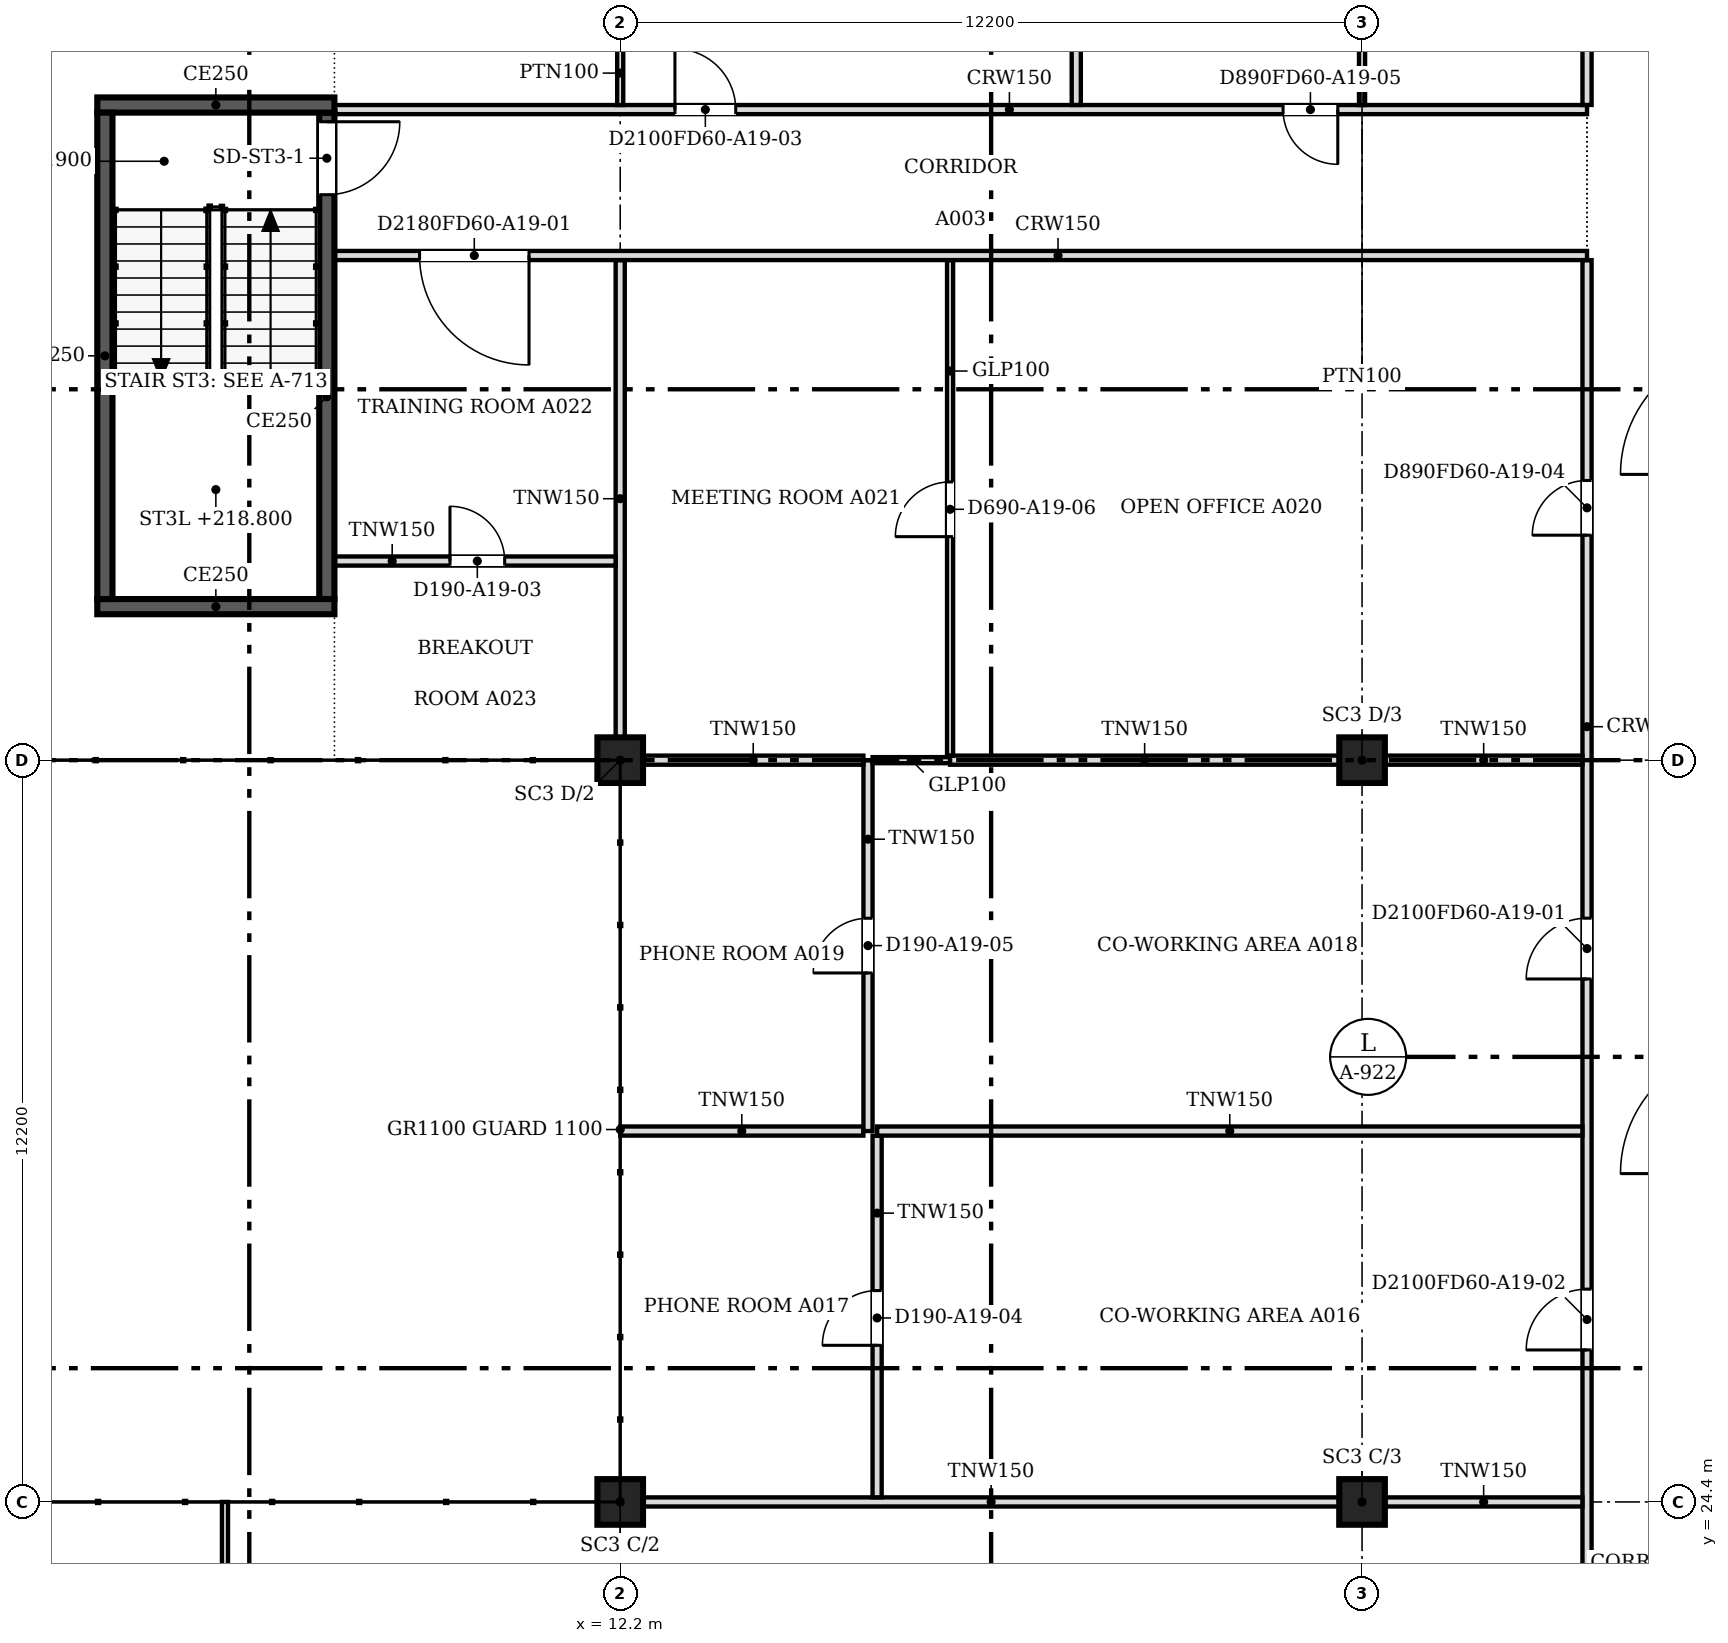
"""IFC4 building model, lengths in metres.
Left out: names, types, materials, properties, quantities, classifications, styles, units other than length and angle.
Written with IfcOpenShell. Run it as: python <this file> out.ifc"""

import sys

from ifc_helpers import new_model, si_unit, direction, frame, frame_2d, origin, origin_2d, place, context, subcontext, project, spatial, rectangle, extrude, source, transform, mapped, element, fill, save


model = new_model("IFC4")
c1 = context("Model", 3, precision=1e-05, world=origin(), true_north=direction((0.0, 1.0)))
c2 = subcontext(c1, "Body", "Model", "MODEL_VIEW")
j1 = project(units=[si_unit("LENGTHUNIT", "METRE"), si_unit("PLANEANGLEUNIT", "RADIAN")], contexts=[c1])
p1 = place(None, origin())
s1 = spatial("IfcSite", under=j1, at=p1, CompositionType="ELEMENT")
p2 = place(p1, origin())
s2 = spatial("IfcBuilding", under=s1, at=p2, CompositionType="ELEMENT")
p3 = place(p2, frame((0.0, 0.0, 216.9)))
s3 = spatial("IfcBuildingStorey", under=s2, at=p3, CompositionType="ELEMENT", Elevation=216.9)
for number, where, z_axis, x_axis in (
    (1, (12.2, 24.4, 0.0), (0.0, 0.0, 1.0), (1.0, 0.0, 0.0)),
    (2, (12.2, 36.6, 0.0), (0.0, 0.0, 1.0), (1.0, 0.0, 0.0)),
    (3, (24.4, 24.4, 0.0), (0.0, 0.0, 1.0), (1.0, 0.0, 0.0)),
    (4, (24.4, 36.6, 0.0), (0.0, 0.0, 1.0), (1.0, 0.0, 0.0)),
):
    element("IfcColumn", number, at=place(p3, frame(where, z_axis=z_axis, x_axis=x_axis)), inside=s3, PredefinedType="COLUMN", context=c2, shape_type="SweptSolid", body=[
        extrude(rectangle(XDim=0.75, YDim=0.75, at=origin_2d()), origin(), (0.0, 0.0, 1.0), 3.6),
    ])
p4 = place(p3, frame((7.5, 39.125, 0.0), z_axis=(0.0, 0.0, 1.0), x_axis=(-1.0, 0.0, 0.0)))
e5 = element("IfcWall", 5, at=p4, inside=s3, PredefinedType="SOLIDWALL", context=c2, shape_type="SweptSolid", body=[
    extrude(rectangle(XDim=3.9, YDim=0.25, at=frame_2d((1.95, 0.0))), origin(), (0.0, 0.0, 1.0), 3.8),
])
p5 = place(p3, frame((3.725, 39.25, 0.0), z_axis=(0.0, 0.0, 1.0), x_axis=(0.0, 1.0, 0.0)))
e6 = element("IfcWall", 6, at=p5, inside=s3, PredefinedType="SOLIDWALL", context=c2, shape_type="SweptSolid", body=[
    extrude(rectangle(XDim=8.0, YDim=0.25, at=frame_2d((4.0, 0.0))), origin(), (0.0, 0.0, 1.0), 3.8),
])
p6 = place(p3, frame((3.6, 47.375, 0.0), z_axis=(0.0, 0.0, 1.0), x_axis=(1.0, 0.0, 0.0)))
e7 = element("IfcWall", 7, at=p6, inside=s3, PredefinedType="SOLIDWALL", context=c2, shape_type="SweptSolid", body=[
    extrude(rectangle(XDim=3.9, YDim=0.25, at=frame_2d((1.95, 0.0))), origin(), (0.0, 0.0, 1.0), 3.8),
])
p7 = place(p3, frame((7.375, 47.25, 0.0), z_axis=(0.0, 0.0, 1.0), x_axis=(0.0, -1.0, 0.0)))
e8 = element("IfcWall", 8, at=p7, inside=s3, PredefinedType="SOLIDWALL", context=c2, shape_type="SweptSolid", body=[
    extrude(rectangle(XDim=8.0, YDim=0.25, at=frame_2d((4.0, 0.0))), origin(), (0.0, 0.0, 1.0), 3.8),
])
m1 = source(origin(), c2, "Body", "SweptSolid", [
    extrude(rectangle(XDim=1.2, YDim=2.1, at=frame_2d((0.6, 1.05))), frame((0.0, 0.135, 0.0), z_axis=(0.0, -1.0, 0.0), x_axis=(1.0, 0.0, 0.0)), (0.0, 0.0, 1.0), 0.27),
])
p8 = place(p7, frame((0.15, 0.0, 0.0)))
e9 = element("IfcOpeningElement", 9, at=p8, cuts=e8, PredefinedType="OPENING", context=c2, shape_type="MappedRepresentation", body=[
    mapped(m1, transform((0.0, 0.0, 0.0), scale=1.0)),
])
p9 = place(p3, frame((28.1, 18.8, 0.0), z_axis=(0.0, 0.0, 1.0), x_axis=(0.0, 1.0, 0.0)))
e10 = element("IfcWall", 10, at=p9, inside=s3, PredefinedType="PARTITIONING", context=c2, shape_type="SweptSolid", body=[
    extrude(rectangle(XDim=26.024, YDim=0.15, at=frame_2d((13.012, 0.0))), origin(), (0.0, 0.0, 1.0), 3.067),
])
m2 = source(origin(), c2, "Body", "SweptSolid", [
    extrude(rectangle(XDim=0.9, YDim=2.1, at=frame_2d((0.45, 1.05))), frame((0.0, 0.085, 0.0), z_axis=(0.0, -1.0, 0.0), x_axis=(1.0, 0.0, 0.0)), (0.0, 0.0, 1.0), 0.17),
])
p10 = place(p9, frame((1.1, 0.0, 0.0)))
e11 = element("IfcOpeningElement", 11, at=p10, cuts=e10, PredefinedType="OPENING", context=c2, shape_type="MappedRepresentation", body=[
    mapped(m2, transform((0.0, 0.0, 0.0), scale=1.0)),
])
m3 = source(origin(), c2, "Body", "SweptSolid", [
    extrude(rectangle(XDim=1.0, YDim=2.1, at=frame_2d((0.5, 1.05))), frame((0.0, 0.085, 0.0), z_axis=(0.0, -1.0, 0.0), x_axis=(1.0, 0.0, 0.0)), (0.0, 0.0, 1.0), 0.17),
])
p11 = place(p9, frame((14.201, 0.0, 0.0)))
e12 = element("IfcOpeningElement", 12, at=p11, cuts=e10, PredefinedType="OPENING", context=c2, shape_type="MappedRepresentation", body=[
    mapped(m3, transform((0.0, 0.0, 0.0), scale=1.0)),
])
p12 = place(p9, frame((8.1, 0.0, 0.0)))
e13 = element("IfcOpeningElement", 13, at=p12, cuts=e10, PredefinedType="OPENING", context=c2, shape_type="MappedRepresentation", body=[
    mapped(m3, transform((0.0, 0.0, 0.0), scale=1.0)),
])
p13 = place(p9, frame((21.5, 0.0, 0.0)))
e14 = element("IfcOpeningElement", 14, at=p13, cuts=e10, PredefinedType="OPENING", context=c2, shape_type="MappedRepresentation", body=[
    mapped(m2, transform((0.0, 0.0, 0.0), scale=1.0)),
])
p14 = place(p3, frame((5.7, 18.99, 0.0), z_axis=(0.0, 0.0, 1.0), x_axis=(0.0, 1.0, 0.0)))
e15 = element("IfcWall", 15, at=p14, inside=s3, PredefinedType="PARTITIONING", context=c2, shape_type="SweptSolid", body=[
    extrude(rectangle(XDim=5.41, YDim=0.1, at=frame_2d((2.705, 0.0))), origin(), (0.0, 0.0, 1.0), 3.067),
])
m4 = source(origin(), c2, "Body", "SweptSolid", [
    extrude(rectangle(XDim=0.9, YDim=2.1, at=frame_2d((0.45, 1.05))), frame((0.0, 0.06, 0.0), z_axis=(0.0, -1.0, 0.0), x_axis=(1.0, 0.0, 0.0)), (0.0, 0.0, 1.0), 0.12),
])
p15 = place(p14, frame((2.3, 0.0, 0.0)))
e16 = element("IfcOpeningElement", 16, at=p15, cuts=e15, PredefinedType="OPENING", context=c2, shape_type="MappedRepresentation", body=[
    mapped(m4, transform((0.0, 0.0, 0.0), scale=1.0)),
])
p16 = place(p3, frame((12.576, 24.4, 0.0), z_axis=(0.0, 0.0, 1.0), x_axis=(1.0, 0.0, 0.0)))
e17 = element("IfcWall", 17, at=p16, inside=s3, PredefinedType="PARTITIONING", context=c2, shape_type="SweptSolid", body=[
    extrude(rectangle(XDim=11.448, YDim=0.15, at=frame_2d((5.724, 0.0))), origin(), (0.0, 0.0, 1.0), 3.067),
])
p17 = place(p3, frame((24.776, 24.4, 0.0), z_axis=(0.0, 0.0, 1.0), x_axis=(1.0, 0.0, 0.0)))
e18 = element("IfcWall", 18, at=p17, inside=s3, PredefinedType="PARTITIONING", context=c2, shape_type="SweptSolid", body=[
    extrude(rectangle(XDim=3.248, YDim=0.15, at=frame_2d((1.624, 0.0))), origin(), (0.0, 0.0, 1.0), 3.067),
])
p18 = place(p3, frame((16.425, 24.476, 0.0), z_axis=(0.0, 0.0, 1.0), x_axis=(0.0, 1.0, 0.0)))
e19 = element("IfcWall", 19, at=p18, inside=s3, PredefinedType="PARTITIONING", context=c2, shape_type="SweptSolid", body=[
    extrude(rectangle(XDim=5.948, YDim=0.15, at=frame_2d((2.974, 0.0))), origin(), (0.0, 0.0, 1.0), 3.067),
])
p19 = place(p18, frame((2.5, 0.0, 0.0)))
e20 = element("IfcOpeningElement", 20, at=p19, cuts=e19, PredefinedType="OPENING", context=c2, shape_type="MappedRepresentation", body=[
    mapped(m2, transform((0.0, 0.0, 0.0), scale=1.0)),
])
p20 = place(p3, frame((12.2, 30.5, 0.0), z_axis=(0.0, 0.0, 1.0), x_axis=(1.0, 0.0, 0.0)))
e21 = element("IfcWall", 21, at=p20, inside=s3, PredefinedType="PARTITIONING", context=c2, shape_type="SweptSolid", body=[
    extrude(rectangle(XDim=3.999, YDim=0.15, at=frame_2d((2.0, 0.0))), origin(), (0.0, 0.0, 1.0), 3.067),
])
p21 = place(p3, frame((16.275, 30.5, 0.0), z_axis=(0.0, 0.0, 1.0), x_axis=(0.0, 1.0, 0.0)))
e22 = element("IfcWall", 22, at=p21, inside=s3, PredefinedType="PARTITIONING", context=c2, shape_type="SweptSolid", body=[
    extrude(rectangle(XDim=6.1, YDim=0.15, at=frame_2d((3.05, 0.0))), origin(), (0.0, 0.0, 1.0), 3.067),
])
p22 = place(p21, frame((2.6, 0.0, 0.0)))
e23 = element("IfcOpeningElement", 23, at=p22, cuts=e22, PredefinedType="OPENING", context=c2, shape_type="MappedRepresentation", body=[
    mapped(m2, transform((0.0, 0.0, 0.0), scale=1.0)),
])
p23 = place(p3, frame((16.425, 30.5, 0.0), z_axis=(0.0, 0.0, 1.0), x_axis=(1.0, 0.0, 0.0)))
e24 = element("IfcWall", 24, at=p23, inside=s3, PredefinedType="PARTITIONING", context=c2, shape_type="SweptSolid", body=[
    extrude(rectangle(XDim=11.599, YDim=0.15, at=frame_2d((5.799, 0.0))), origin(), (0.0, 0.0, 1.0), 3.067),
])
p24 = place(p3, frame((12.576, 36.6, 0.0), z_axis=(0.0, 0.0, 1.0), x_axis=(1.0, 0.0, 0.0)))
e25 = element("IfcWall", 25, at=p24, inside=s3, PredefinedType="PARTITIONING", context=c2, shape_type="SweptSolid", body=[
    extrude(rectangle(XDim=3.623, YDim=0.15, at=frame_2d((1.812, 0.0))), origin(), (0.0, 0.0, 1.0), 3.067),
])
p25 = place(p3, frame((16.351, 36.6, 0.0), z_axis=(0.0, 0.0, 1.0), x_axis=(1.0, 0.0, 0.0)))
e26 = element("IfcWall", 26, at=p25, inside=s3, PredefinedType="PARTITIONING", context=c2, shape_type="SweptSolid", body=[
    extrude(rectangle(XDim=1.273, YDim=0.1, at=frame_2d((0.636, 0.0))), origin(), (0.0, 0.0, 1.0), 3.067),
])
p26 = place(p3, frame((17.625, 36.6, 0.0), z_axis=(0.0, 0.0, 1.0), x_axis=(1.0, 0.0, 0.0)))
e27 = element("IfcWall", 27, at=p26, inside=s3, PredefinedType="PARTITIONING", context=c2, shape_type="SweptSolid", body=[
    extrude(rectangle(XDim=6.399, YDim=0.15, at=frame_2d((3.199, 0.0))), origin(), (0.0, 0.0, 1.0), 3.067),
])
p27 = place(p3, frame((24.776, 36.6, 0.0), z_axis=(0.0, 0.0, 1.0), x_axis=(1.0, 0.0, 0.0)))
e28 = element("IfcWall", 28, at=p27, inside=s3, PredefinedType="PARTITIONING", context=c2, shape_type="SweptSolid", body=[
    extrude(rectangle(XDim=3.248, YDim=0.15, at=frame_2d((1.624, 0.0))), origin(), (0.0, 0.0, 1.0), 3.067),
])
p28 = place(p3, frame((17.625, 36.676, 0.0), z_axis=(0.0, 0.0, 1.0), x_axis=(0.0, 1.0, 0.0)))
e29 = element("IfcWall", 29, at=p28, inside=s3, PredefinedType="PARTITIONING", context=c2, shape_type="SweptSolid", body=[
    extrude(rectangle(XDim=8.148, YDim=0.1, at=frame_2d((4.074, 0.0))), origin(), (0.0, 0.0, 1.0), 3.067),
])
p29 = place(p28, frame((3.6, 0.0, 0.0)))
e30 = element("IfcOpeningElement", 30, at=p29, cuts=e29, PredefinedType="OPENING", context=c2, shape_type="MappedRepresentation", body=[
    mapped(m4, transform((0.0, 0.0, 0.0), scale=1.0)),
])
p30 = place(p3, frame((12.2, 36.976, 0.0), z_axis=(0.0, 0.0, 1.0), x_axis=(0.0, 1.0, 0.0)))
e31 = element("IfcWall", 31, at=p30, inside=s3, PredefinedType="PARTITIONING", context=c2, shape_type="SweptSolid", body=[
    extrude(rectangle(XDim=7.848, YDim=0.15, at=frame_2d((3.924, 0.0))), origin(), (0.0, 0.0, 1.0), 3.067),
])
p31 = place(p3, frame((12.124, 39.875, 0.0), z_axis=(0.0, 0.0, 1.0), x_axis=(-1.0, 0.0, 0.0)))
e32 = element("IfcWall", 32, at=p31, inside=s3, PredefinedType="PARTITIONING", context=c2, shape_type="SweptSolid", body=[
    extrude(rectangle(XDim=4.624, YDim=0.15, at=frame_2d((2.312, 0.0))), origin(), (0.0, 0.0, 1.0), 3.067),
])
p32 = place(p31, frame((1.824, 0.0, 0.0)))
e33 = element("IfcOpeningElement", 33, at=p32, cuts=e32, PredefinedType="OPENING", context=c2, shape_type="MappedRepresentation", body=[
    mapped(m2, transform((0.0, 0.0, 0.0), scale=1.0)),
])
p33 = place(p3, frame((28.1, 44.9, 0.0), z_axis=(0.0, 0.0, 1.0), x_axis=(-1.0, 0.0, 0.0)))
e34 = element("IfcWall", 34, at=p33, inside=s3, PredefinedType="PARTITIONING", context=c2, shape_type="SweptSolid", body=[
    extrude(rectangle(XDim=20.6, YDim=0.15, at=frame_2d((10.3, 0.0))), origin(), (0.0, 0.0, 1.0), 3.067),
])
m5 = source(origin(), c2, "Body", "SweptSolid", [
    extrude(rectangle(XDim=1.8, YDim=2.1, at=frame_2d((0.9, 1.05))), frame((0.0, 0.085, 0.0), z_axis=(0.0, -1.0, 0.0), x_axis=(1.0, 0.0, 0.0)), (0.0, 0.0, 1.0), 0.17),
])
p34 = place(p33, frame((17.4, 0.0, 0.0)))
e35 = element("IfcOpeningElement", 35, at=p34, cuts=e34, PredefinedType="OPENING", context=c2, shape_type="MappedRepresentation", body=[
    mapped(m5, transform((0.0, 0.0, 0.0), scale=1.0)),
])
p35 = place(p3, frame((7.5, 47.3, 0.0), z_axis=(0.0, 0.0, 1.0), x_axis=(1.0, 0.0, 0.0)))
e36 = element("IfcWall", 36, at=p35, inside=s3, PredefinedType="PARTITIONING", context=c2, shape_type="SweptSolid", body=[
    extrude(rectangle(XDim=20.6, YDim=0.15, at=frame_2d((10.3, 0.0))), origin(), (0.0, 0.0, 1.0), 3.067),
])
p36 = place(p35, frame((15.601, 0.0, 0.0)))
e37 = element("IfcOpeningElement", 37, at=p36, cuts=e36, PredefinedType="OPENING", context=c2, shape_type="MappedRepresentation", body=[
    mapped(m2, transform((0.0, 0.0, 0.0), scale=1.0)),
])
p37 = place(p35, frame((5.6, 0.0, 0.0)))
e38 = element("IfcOpeningElement", 38, at=p37, cuts=e36, PredefinedType="OPENING", context=c2, shape_type="MappedRepresentation", body=[
    mapped(m3, transform((0.0, 0.0, 0.0), scale=1.0)),
])
p38 = place(p3, frame((19.7, 47.376, 0.0), z_axis=(0.0, 0.0, 1.0), x_axis=(0.0, 1.0, 0.0)))
e39 = element("IfcWall", 39, at=p38, inside=s3, PredefinedType="PARTITIONING", context=c2, shape_type="SweptSolid", body=[
    extrude(rectangle(XDim=3.274, YDim=0.15, at=frame_2d((1.637, 0.0))), origin(), (0.0, 0.0, 1.0), 3.067),
])
p39 = place(p3, frame((28.1, 47.376, 0.0), z_axis=(0.0, 0.0, 1.0), x_axis=(0.0, 1.0, 0.0)))
e40 = element("IfcWall", 40, at=p39, inside=s3, PredefinedType="PARTITIONING", context=c2, shape_type="SweptSolid", body=[
    extrude(rectangle(XDim=3.748, YDim=0.15, at=frame_2d((1.874, 0.0))), origin(), (0.0, 0.0, 1.0), 3.067),
])
for number, where, z_axis, x_axis in (
    (41, (12.2, 48.425, 0.0), (0.0, 0.0, 1.0), (0.0, -1.0, 0.0)),
    (42, (24.4, 48.425, 0.0), (0.0, 0.0, 1.0), (0.0, -1.0, 0.0)),
):
    element("IfcWall", number, at=place(p3, frame(where, z_axis=z_axis, x_axis=x_axis)), inside=s3, PredefinedType="PARTITIONING", context=c2, shape_type="SweptSolid", body=[
        extrude(rectangle(XDim=1.05, YDim=0.1, at=frame_2d((0.525, 0.0))), origin(), (0.0, 0.0, 1.0), 3.067),
    ])
m6 = source(origin(), c2, "Body", "SweptSolid", [
    extrude(rectangle(XDim=1.2, YDim=2.1, at=frame_2d((0.6, 1.05))), frame((0.0, 0.025, 0.0), z_axis=(0.0, -1.0, 0.0), x_axis=(1.0, 0.0, 0.0)), (0.0, 0.0, 1.0), 0.05),
])
p40 = place(p8, origin())
e43 = element("IfcDoor", 43, at=p40, inside=s3, OperationType="SINGLE_SWING_LEFT", PredefinedType="DOOR", context=c2, shape_type="MappedRepresentation", body=[
    mapped(m6, transform((0.0, 0.0, 0.0), scale=1.0)),
])
fill(e9, e43)
m7 = source(origin(), c2, "Body", "SweptSolid", [
    extrude(rectangle(XDim=0.9, YDim=2.1, at=frame_2d((0.45, 1.05))), frame((0.0, 0.025, 0.0), z_axis=(0.0, -1.0, 0.0), x_axis=(1.0, 0.0, 0.0)), (0.0, 0.0, 1.0), 0.05),
])
p41 = place(p32, origin())
e44 = element("IfcDoor", 44, at=p41, inside=s3, OperationType="SINGLE_SWING_RIGHT", PredefinedType="DOOR", context=c2, shape_type="MappedRepresentation", body=[
    mapped(m7, transform((0.0, 0.0, 0.0), scale=1.0)),
])
fill(e33, e44)
m8 = source(origin(), c2, "Body", "SweptSolid", [
    extrude(rectangle(XDim=1.8, YDim=2.1, at=frame_2d((0.9, 1.05))), frame((0.0, 0.025, 0.0), z_axis=(0.0, -1.0, 0.0), x_axis=(1.0, 0.0, 0.0)), (0.0, 0.0, 1.0), 0.05),
])
p42 = place(p34, origin())
e45 = element("IfcDoor", 45, at=p42, inside=s3, OperationType="DOUBLE_DOOR_SINGLE_SWING", PredefinedType="DOOR", context=c2, shape_type="MappedRepresentation", body=[
    mapped(m8, transform((0.0, 0.0, 0.0), scale=1.0)),
])
fill(e35, e45)
p43 = place(p19, origin())
e46 = element("IfcDoor", 46, at=p43, inside=s3, OperationType="SINGLE_SWING_LEFT", PredefinedType="DOOR", context=c2, shape_type="MappedRepresentation", body=[
    mapped(m7, transform((0.0, 0.0, 0.0), scale=1.0)),
])
fill(e20, e46)
m9 = source(origin(), c2, "Body", "SweptSolid", [
    extrude(rectangle(XDim=1.0, YDim=2.1, at=frame_2d((0.5, 1.05))), frame((0.0, 0.025, 0.0), z_axis=(0.0, -1.0, 0.0), x_axis=(1.0, 0.0, 0.0)), (0.0, 0.0, 1.0), 0.05),
])
p44 = place(p11, origin())
e47 = element("IfcDoor", 47, at=p44, inside=s3, OperationType="SINGLE_SWING_LEFT", PredefinedType="DOOR", context=c2, shape_type="MappedRepresentation", body=[
    mapped(m9, transform((0.0, 0.0, 0.0), scale=1.0)),
])
fill(e12, e47)
p45 = place(p12, origin())
e48 = element("IfcDoor", 48, at=p45, inside=s3, OperationType="SINGLE_SWING_LEFT", PredefinedType="DOOR", context=c2, shape_type="MappedRepresentation", body=[
    mapped(m9, transform((0.0, 0.0, 0.0), scale=1.0)),
])
fill(e13, e48)
p46 = place(p22, origin())
e49 = element("IfcDoor", 49, at=p46, inside=s3, OperationType="SINGLE_SWING_LEFT", PredefinedType="DOOR", context=c2, shape_type="MappedRepresentation", body=[
    mapped(m7, transform((0.0, 0.0, 0.0), scale=1.0)),
])
fill(e23, e49)
p47 = place(p29, origin())
e50 = element("IfcDoor", 50, at=p47, inside=s3, OperationType="SINGLE_SWING_LEFT", PredefinedType="DOOR", context=c2, shape_type="MappedRepresentation", body=[
    mapped(m7, transform((0.0, 0.0, 0.0), scale=1.0)),
])
fill(e30, e50)
p48 = place(p13, origin())
e51 = element("IfcDoor", 51, at=p48, inside=s3, OperationType="SINGLE_SWING_LEFT", PredefinedType="DOOR", context=c2, shape_type="MappedRepresentation", body=[
    mapped(m7, transform((0.0, 0.0, 0.0), scale=1.0)),
])
fill(e14, e51)
p49 = place(p36, origin())
e52 = element("IfcDoor", 52, at=p49, inside=s3, OperationType="SINGLE_SWING_RIGHT", PredefinedType="DOOR", context=c2, shape_type="MappedRepresentation", body=[
    mapped(m7, transform((0.0, 0.0, 0.0), scale=1.0)),
])
fill(e37, e52)
p50 = place(p37, origin())
e53 = element("IfcDoor", 53, at=p50, inside=s3, OperationType="SINGLE_SWING_LEFT", PredefinedType="DOOR", context=c2, shape_type="MappedRepresentation", body=[
    mapped(m9, transform((0.0, 0.0, 0.0), scale=1.0)),
])
fill(e38, e53)
save(model, sys.argv[1])
